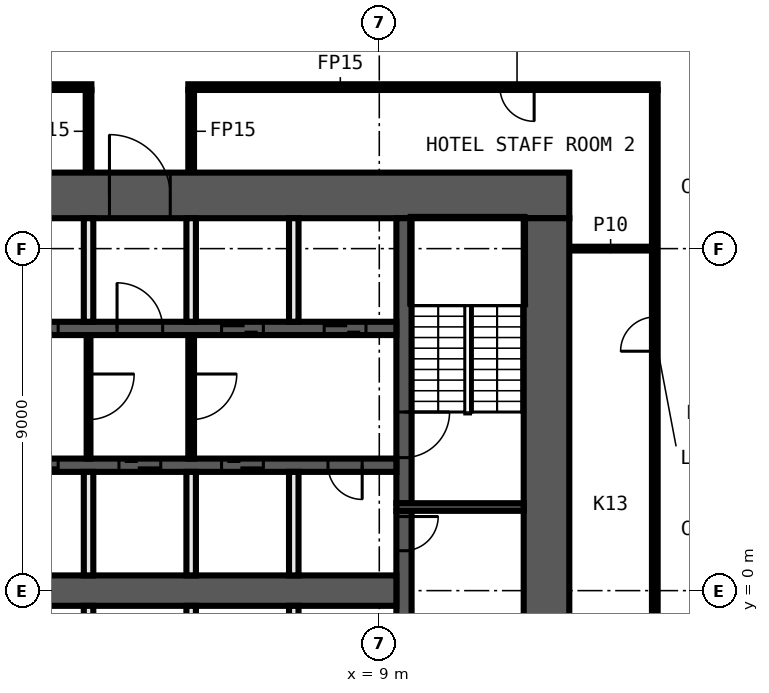
"""IFC4 building model, lengths in metres.
Left out: names, types, materials, properties, quantities, classifications, styles, units other than length and angle.
Written with IfcOpenShell. Run it as: python <this file> out.ifc"""

import sys

from ifc_helpers import new_model, si_unit, direction, frame, frame_2d, origin, place, context, subcontext, project, spatial, rectangle, extrude, element, fill, save


model = new_model("IFC4")
c1 = context("Model", 3, precision=1e-05, world=origin(), true_north=direction((0.0, 1.0)))
c2 = subcontext(c1, "Body", "Model", "MODEL_VIEW")
j1 = project(units=[si_unit("LENGTHUNIT", "METRE"), si_unit("PLANEANGLEUNIT", "RADIAN")], contexts=[c1])
p1 = place(None, origin())
s1 = spatial("IfcSite", under=j1, at=p1, CompositionType="ELEMENT")
p2 = place(p1, origin())
s2 = spatial("IfcBuilding", under=s1, at=p2, CompositionType="ELEMENT")
p3 = place(p2, frame((0.0, 0.0, 55.1)))
s3 = spatial("IfcBuildingStorey", under=s2, at=p3, CompositionType="ELEMENT", Elevation=55.1)
p4 = place(p3, frame((14.0, 9.0, 0.0), z_axis=(0.0, 0.0, 1.0), x_axis=(1.0, 0.0, 0.0)))
e1 = element("IfcWall", 1, at=p4, inside=s3, PredefinedType="PARTITIONING", context=c2, shape_type="SweptSolid", body=[
    extrude(rectangle(XDim=2.175, YDim=0.1, at=frame_2d((1.087, 0.0))), origin(), (0.0, 0.0, 1.0), 3.3),
])
p5 = place(p3, frame((1.425, 13.25, 0.0), z_axis=(0.0, 0.0, 1.0), x_axis=(-1.0, 0.0, 0.0)))
e2 = element("IfcWall", 2, at=p5, inside=s3, PredefinedType="PARTITIONING", context=c2, shape_type="SweptSolid", body=[
    extrude(rectangle(XDim=17.75, YDim=0.15, at=frame_2d((8.875, 0.0))), origin(), (0.0, 0.0, 1.0), 3.3),
])
p6 = place(p5, frame((7.725, 0.0, 0.0)))
e3 = element("IfcOpeningElement", 3, at=p6, cuts=e2, PredefinedType="OPENING", context=c2, shape_type="SweptSolid", body=[
    extrude(rectangle(XDim=0.9, YDim=2.1, at=frame_2d((0.45, 1.05))), frame((0.0, 0.085, 0.0), z_axis=(0.0, -1.0, 0.0), x_axis=(1.0, 0.0, 0.0)), (0.0, 0.0, 1.0), 0.17),
])
p7 = place(p5, frame((13.6, 0.0, 0.0)))
e4 = element("IfcOpeningElement", 4, at=p7, cuts=e2, PredefinedType="OPENING", context=c2, shape_type="SweptSolid", body=[
    extrude(rectangle(XDim=0.9, YDim=2.1, at=frame_2d((0.45, 1.05))), frame((0.0, 0.085, 0.0), z_axis=(0.0, -1.0, 0.0), x_axis=(1.0, 0.0, 0.0)), (0.0, 0.0, 1.0), 0.17),
])
p8 = place(p3, frame((16.325, 13.25, 0.0), z_axis=(0.0, 0.0, 1.0), x_axis=(-1.0, 0.0, 0.0)))
e5 = element("IfcWall", 5, at=p8, inside=s3, PredefinedType="PARTITIONING", context=c2, shape_type="SweptSolid", body=[
    extrude(rectangle(XDim=12.35, YDim=0.15, at=frame_2d((6.175, 0.0))), origin(), (0.0, 0.0, 1.0), 3.3),
])
p9 = place(p8, frame((3.25, 0.0, 0.0)))
e6 = element("IfcOpeningElement", 6, at=p9, cuts=e5, PredefinedType="OPENING", context=c2, shape_type="SweptSolid", body=[
    extrude(rectangle(XDim=0.9, YDim=2.1, at=frame_2d((0.45, 1.05))), frame((0.0, 0.085, 0.0), z_axis=(0.0, -1.0, 0.0), x_axis=(1.0, 0.0, 0.0)), (0.0, 0.0, 1.0), 0.17),
])
p10 = place(p3, frame((16.25, -13.175, 0.0), z_axis=(0.0, 0.0, 1.0), x_axis=(0.0, 1.0, 0.0)))
e7 = element("IfcWall", 7, at=p10, inside=s3, PredefinedType="PARTITIONING", context=c2, shape_type="SweptSolid", body=[
    extrude(rectangle(XDim=26.35, YDim=0.15, at=frame_2d((13.175, 0.0))), origin(), (0.0, 0.0, 1.0), 3.3),
])
p11 = place(p10, frame((19.475, 0.0, 0.0)))
e8 = element("IfcOpeningElement", 8, at=p11, cuts=e7, PredefinedType="OPENING", context=c2, shape_type="SweptSolid", body=[
    extrude(rectangle(XDim=0.9, YDim=2.1, at=frame_2d((0.45, 1.05))), frame((0.0, 0.085, 0.0), z_axis=(0.0, -1.0, 0.0), x_axis=(1.0, 0.0, 0.0)), (0.0, 0.0, 1.0), 0.17),
])
for number, where, z_axis, x_axis in (
    (9, (4.05, 11.0, 0.0), (0.0, 0.0, 1.0), (0.0, 1.0, 0.0)),
    (10, (1.35, 11.0, 0.0), (0.0, 0.0, 1.0), (0.0, 1.0, 0.0)),
):
    element("IfcWall", number, at=place(p3, frame(where, z_axis=z_axis, x_axis=x_axis)), inside=s3, PredefinedType="PARTITIONING", context=c2, shape_type="SweptSolid", body=[
        extrude(rectangle(XDim=2.175, YDim=0.15, at=frame_2d((1.087, 0.0))), origin(), (0.0, 0.0, 1.0), 3.3),
    ])
p12 = place(p3, frame((-14.0, 10.4, 0.0), z_axis=(0.0, 0.0, 1.0), x_axis=(1.0, 0.0, 0.0)))
e11 = element("IfcWall", 11, at=p12, inside=s3, PredefinedType="SHEAR", context=c2, shape_type="SweptSolid", body=[
    extrude(rectangle(XDim=28.0, YDim=1.2, at=frame_2d((14.0, 0.0))), origin(), (0.0, 0.0, 1.0), 3.3),
])
p13 = place(p12, frame((15.9, 0.0, 0.0)))
e12 = element("IfcOpeningElement", 12, at=p13, cuts=e11, PredefinedType="OPENING", context=c2, shape_type="SweptSolid", body=[
    extrude(rectangle(XDim=1.6, YDim=2.1, at=frame_2d((0.8, 1.05))), frame((0.0, 0.61, 0.0), z_axis=(0.0, -1.0, 0.0), x_axis=(1.0, 0.0, 0.0)), (0.0, 0.0, 1.0), 1.22),
])
p14 = place(p3, frame((13.4, 9.8, 0.0), z_axis=(0.0, 0.0, 1.0), x_axis=(0.0, -1.0, 0.0)))
e13 = element("IfcWall", 13, at=p14, inside=s3, PredefinedType="SHEAR", context=c2, shape_type="SweptSolid", body=[
    extrude(rectangle(XDim=19.6, YDim=1.2, at=frame_2d((9.8, 0.0))), origin(), (0.0, 0.0, 1.0), 3.3),
])
p15 = place(p3, frame((9.65, 2.1, 0.0), z_axis=(0.0, 0.0, 1.0), x_axis=(0.0, -1.0, 0.0)))
e14 = element("IfcWall", 14, at=p15, inside=s3, PredefinedType="SHEAR", context=c2, shape_type="SweptSolid", body=[
    extrude(rectangle(XDim=4.2, YDim=0.4, at=frame_2d((2.1, 0.0))), origin(), (0.0, 0.0, 1.0), 3.3),
])
p16 = place(p15, frame((0.15, 0.0, 0.0)))
e15 = element("IfcOpeningElement", 15, at=p16, cuts=e14, PredefinedType="OPENING", context=c2, shape_type="SweptSolid", body=[
    extrude(rectangle(XDim=0.9, YDim=2.1, at=frame_2d((0.45, 1.05))), frame((0.0, 0.21, 0.0), z_axis=(0.0, -1.0, 0.0), x_axis=(1.0, 0.0, 0.0)), (0.0, 0.0, 1.0), 0.42),
])
p17 = place(p3, frame((9.65, 9.8, 0.0), z_axis=(0.0, 0.0, 1.0), x_axis=(0.0, -1.0, 0.0)))
e16 = element("IfcWall", 16, at=p17, inside=s3, PredefinedType="SHEAR", context=c2, shape_type="SweptSolid", body=[
    extrude(rectangle(XDim=7.5, YDim=0.4, at=frame_2d((3.75, 0.0))), origin(), (0.0, 0.0, 1.0), 3.3),
])
p18 = place(p17, frame((5.1, 0.0, 0.0)))
e17 = element("IfcOpeningElement", 17, at=p18, cuts=e16, PredefinedType="OPENING", context=c2, shape_type="SweptSolid", body=[
    extrude(rectangle(XDim=1.2, YDim=2.1, at=frame_2d((0.6, 1.05))), frame((0.0, 0.21, 0.0), z_axis=(0.0, -1.0, 0.0), x_axis=(1.0, 0.0, 0.0)), (0.0, 0.0, 1.0), 0.42),
])
p19 = place(p3, frame((9.45, 2.2, 0.0), z_axis=(0.0, 0.0, 1.0), x_axis=(1.0, 0.0, 0.0)))
e18 = element("IfcWall", 18, at=p19, inside=s3, PredefinedType="SHEAR", context=c2, shape_type="SweptSolid", body=[
    extrude(rectangle(XDim=3.35, YDim=0.2, at=frame_2d((1.675, 0.0))), origin(), (0.0, 0.0, 1.0), 3.3),
])
p20 = place(p3, frame((-9.45, 6.9, 0.0), z_axis=(0.0, 0.0, 1.0), x_axis=(1.0, 0.0, 0.0)))
e19 = element("IfcWall", 19, at=p20, inside=s3, PredefinedType="SHEAR", context=c2, shape_type="SweptSolid", body=[
    extrude(rectangle(XDim=18.9, YDim=0.35, at=frame_2d((9.45, 0.0))), origin(), (0.0, 0.0, 1.0), 3.3),
])
p21 = place(p20, frame((0.8, 0.0, 0.0)))
e20 = element("IfcOpeningElement", 20, at=p21, cuts=e19, PredefinedType="OPENING", context=c2, shape_type="SweptSolid", body=[
    extrude(rectangle(XDim=1.1, YDim=2.1, at=frame_2d((0.55, 1.05))), frame((0.0, 0.185, 0.0), z_axis=(0.0, -1.0, 0.0), x_axis=(1.0, 0.0, 0.0)), (0.0, 0.0, 1.0), 0.37),
])
p22 = place(p20, frame((3.5, 0.0, 0.0)))
e21 = element("IfcOpeningElement", 21, at=p22, cuts=e19, PredefinedType="OPENING", context=c2, shape_type="SweptSolid", body=[
    extrude(rectangle(XDim=1.1, YDim=2.1, at=frame_2d((0.55, 1.05))), frame((0.0, 0.185, 0.0), z_axis=(0.0, -1.0, 0.0), x_axis=(1.0, 0.0, 0.0)), (0.0, 0.0, 1.0), 0.37),
])
p23 = place(p20, frame((6.2, 0.0, 0.0)))
e22 = element("IfcOpeningElement", 22, at=p23, cuts=e19, PredefinedType="OPENING", context=c2, shape_type="SweptSolid", body=[
    extrude(rectangle(XDim=1.1, YDim=2.1, at=frame_2d((0.55, 1.05))), frame((0.0, 0.185, 0.0), z_axis=(0.0, -1.0, 0.0), x_axis=(1.0, 0.0, 0.0)), (0.0, 0.0, 1.0), 0.37),
])
p24 = place(p20, frame((8.9, 0.0, 0.0)))
e23 = element("IfcOpeningElement", 23, at=p24, cuts=e19, PredefinedType="OPENING", context=c2, shape_type="SweptSolid", body=[
    extrude(rectangle(XDim=1.1, YDim=2.1, at=frame_2d((0.55, 1.05))), frame((0.0, 0.185, 0.0), z_axis=(0.0, -1.0, 0.0), x_axis=(1.0, 0.0, 0.0)), (0.0, 0.0, 1.0), 0.37),
])
p25 = place(p20, frame((11.55, 0.0, 0.0)))
e24 = element("IfcOpeningElement", 24, at=p25, cuts=e19, PredefinedType="OPENING", context=c2, shape_type="SweptSolid", body=[
    extrude(rectangle(XDim=1.2, YDim=2.1, at=frame_2d((0.6, 1.05))), frame((0.0, 0.185, 0.0), z_axis=(0.0, -1.0, 0.0), x_axis=(1.0, 0.0, 0.0)), (0.0, 0.0, 1.0), 0.37),
])
p26 = place(p20, frame((14.3, 0.0, 0.0)))
e25 = element("IfcOpeningElement", 25, at=p26, cuts=e19, PredefinedType="OPENING", context=c2, shape_type="SweptSolid", body=[
    extrude(rectangle(XDim=1.1, YDim=2.1, at=frame_2d((0.55, 1.05))), frame((0.0, 0.185, 0.0), z_axis=(0.0, -1.0, 0.0), x_axis=(1.0, 0.0, 0.0)), (0.0, 0.0, 1.0), 0.37),
])
p27 = place(p20, frame((17.0, 0.0, 0.0)))
e26 = element("IfcOpeningElement", 26, at=p27, cuts=e19, PredefinedType="OPENING", context=c2, shape_type="SweptSolid", body=[
    extrude(rectangle(XDim=1.1, YDim=2.1, at=frame_2d((0.55, 1.05))), frame((0.0, 0.185, 0.0), z_axis=(0.0, -1.0, 0.0), x_axis=(1.0, 0.0, 0.0)), (0.0, 0.0, 1.0), 0.37),
])
p28 = place(p3, frame((9.45, 3.3, 0.0), z_axis=(0.0, 0.0, 1.0), x_axis=(-1.0, 0.0, 0.0)))
e27 = element("IfcWall", 27, at=p28, inside=s3, PredefinedType="SHEAR", context=c2, shape_type="SweptSolid", body=[
    extrude(rectangle(XDim=18.9, YDim=0.35, at=frame_2d((9.45, 0.0))), origin(), (0.0, 0.0, 1.0), 3.3),
])
p29 = place(p28, frame((17.0, 0.0, 0.0)))
e28 = element("IfcOpeningElement", 28, at=p29, cuts=e27, PredefinedType="OPENING", context=c2, shape_type="SweptSolid", body=[
    extrude(rectangle(XDim=1.1, YDim=2.1, at=frame_2d((0.55, 1.05))), frame((0.0, 0.185, 0.0), z_axis=(0.0, -1.0, 0.0), x_axis=(1.0, 0.0, 0.0)), (0.0, 0.0, 1.0), 0.37),
])
p30 = place(p28, frame((14.3, 0.0, 0.0)))
e29 = element("IfcOpeningElement", 29, at=p30, cuts=e27, PredefinedType="OPENING", context=c2, shape_type="SweptSolid", body=[
    extrude(rectangle(XDim=1.1, YDim=2.1, at=frame_2d((0.55, 1.05))), frame((0.0, 0.185, 0.0), z_axis=(0.0, -1.0, 0.0), x_axis=(1.0, 0.0, 0.0)), (0.0, 0.0, 1.0), 0.37),
])
p31 = place(p28, frame((11.6, 0.0, 0.0)))
e30 = element("IfcOpeningElement", 30, at=p31, cuts=e27, PredefinedType="OPENING", context=c2, shape_type="SweptSolid", body=[
    extrude(rectangle(XDim=1.1, YDim=2.1, at=frame_2d((0.55, 1.05))), frame((0.0, 0.185, 0.0), z_axis=(0.0, -1.0, 0.0), x_axis=(1.0, 0.0, 0.0)), (0.0, 0.0, 1.0), 0.37),
])
p32 = place(p28, frame((8.9, 0.0, 0.0)))
e31 = element("IfcOpeningElement", 31, at=p32, cuts=e27, PredefinedType="OPENING", context=c2, shape_type="SweptSolid", body=[
    extrude(rectangle(XDim=1.1, YDim=2.1, at=frame_2d((0.55, 1.05))), frame((0.0, 0.185, 0.0), z_axis=(0.0, -1.0, 0.0), x_axis=(1.0, 0.0, 0.0)), (0.0, 0.0, 1.0), 0.37),
])
p33 = place(p28, frame((6.2, 0.0, 0.0)))
e32 = element("IfcOpeningElement", 32, at=p33, cuts=e27, PredefinedType="OPENING", context=c2, shape_type="SweptSolid", body=[
    extrude(rectangle(XDim=1.1, YDim=2.1, at=frame_2d((0.55, 1.05))), frame((0.0, 0.185, 0.0), z_axis=(0.0, -1.0, 0.0), x_axis=(1.0, 0.0, 0.0)), (0.0, 0.0, 1.0), 0.37),
])
p34 = place(p28, frame((3.5, 0.0, 0.0)))
e33 = element("IfcOpeningElement", 33, at=p34, cuts=e27, PredefinedType="OPENING", context=c2, shape_type="SweptSolid", body=[
    extrude(rectangle(XDim=1.1, YDim=2.1, at=frame_2d((0.55, 1.05))), frame((0.0, 0.185, 0.0), z_axis=(0.0, -1.0, 0.0), x_axis=(1.0, 0.0, 0.0)), (0.0, 0.0, 1.0), 0.37),
])
p35 = place(p28, frame((0.9, 0.0, 0.0)))
e34 = element("IfcOpeningElement", 34, at=p35, cuts=e27, PredefinedType="OPENING", context=c2, shape_type="SweptSolid", body=[
    extrude(rectangle(XDim=0.9, YDim=2.1, at=frame_2d((0.45, 1.05))), frame((0.0, 0.185, 0.0), z_axis=(0.0, -1.0, 0.0), x_axis=(1.0, 0.0, 0.0)), (0.0, 0.0, 1.0), 0.37),
])
p36 = place(p3, frame((-9.45, 0.0, 0.0), z_axis=(0.0, 0.0, 1.0), x_axis=(1.0, 0.0, 0.0)))
e35 = element("IfcWall", 35, at=p36, inside=s3, PredefinedType="SHEAR", context=c2, shape_type="SweptSolid", body=[
    extrude(rectangle(XDim=18.9, YDim=0.8, at=frame_2d((9.45, 0.0))), origin(), (0.0, 0.0, 1.0), 3.3),
])
for number, where, z_axis, x_axis in (
    (36, (6.75, -3.125, 0.0), (0.0, 0.0, 1.0), (0.0, 1.0, 0.0)),
    (37, (6.75, 0.4, 0.0), (0.0, 0.0, 1.0), (0.0, 1.0, 0.0)),
    (38, (6.75, 7.075, 0.0), (0.0, 0.0, 1.0), (0.0, 1.0, 0.0)),
):
    element("IfcWall", number, at=place(p3, frame(where, z_axis=z_axis, x_axis=x_axis)), inside=s3, PredefinedType="SOLIDWALL", context=c2, shape_type="SweptSolid", body=[
        extrude(rectangle(XDim=2.725, YDim=0.25, at=frame_2d((1.363, 0.0))), origin(), (0.0, 0.0, 1.0), 3.3),
    ])
p37 = place(p3, frame((4.05, 6.725, 0.0), z_axis=(0.0, 0.0, 1.0), x_axis=(0.0, -1.0, 0.0)))
e39 = element("IfcWall", 39, at=p37, inside=s3, PredefinedType="PARTITIONING", context=c2, shape_type="SweptSolid", body=[
    extrude(rectangle(XDim=3.25, YDim=0.15, at=frame_2d((1.625, 0.0))), origin(), (0.0, 0.0, 1.0), 3.3),
])
p38 = place(p37, frame((1.025, 0.0, 0.0)))
e40 = element("IfcOpeningElement", 40, at=p38, cuts=e39, PredefinedType="OPENING", context=c2, shape_type="SweptSolid", body=[
    extrude(rectangle(XDim=1.2, YDim=2.1, at=frame_2d((0.6, 1.05))), frame((0.0, 0.085, 0.0), z_axis=(0.0, -1.0, 0.0), x_axis=(1.0, 0.0, 0.0)), (0.0, 0.0, 1.0), 0.17),
])
for number, where, z_axis, x_axis in (
    (41, (4.05, -3.125, 0.0), (0.0, 0.0, 1.0), (0.0, 1.0, 0.0)),
    (42, (4.05, 0.4, 0.0), (0.0, 0.0, 1.0), (0.0, 1.0, 0.0)),
    (43, (4.05, 7.075, 0.0), (0.0, 0.0, 1.0), (0.0, 1.0, 0.0)),
):
    element("IfcWall", number, at=place(p3, frame(where, z_axis=z_axis, x_axis=x_axis)), inside=s3, PredefinedType="SOLIDWALL", context=c2, shape_type="SweptSolid", body=[
        extrude(rectangle(XDim=2.725, YDim=0.25, at=frame_2d((1.363, 0.0))), origin(), (0.0, 0.0, 1.0), 3.3),
    ])
p39 = place(p3, frame((1.35, 6.725, 0.0), z_axis=(0.0, 0.0, 1.0), x_axis=(0.0, -1.0, 0.0)))
e44 = element("IfcWall", 44, at=p39, inside=s3, PredefinedType="PARTITIONING", context=c2, shape_type="SweptSolid", body=[
    extrude(rectangle(XDim=3.25, YDim=0.1, at=frame_2d((1.625, 0.0))), origin(), (0.0, 0.0, 1.0), 3.3),
])
p40 = place(p39, frame((1.025, 0.0, 0.0)))
e45 = element("IfcOpeningElement", 45, at=p40, cuts=e44, PredefinedType="OPENING", context=c2, shape_type="SweptSolid", body=[
    extrude(rectangle(XDim=1.2, YDim=2.1, at=frame_2d((0.6, 1.05))), frame((0.0, 0.06, 0.0), z_axis=(0.0, -1.0, 0.0), x_axis=(1.0, 0.0, 0.0)), (0.0, 0.0, 1.0), 0.12),
])
for number, where, z_axis, x_axis in (
    (46, (1.35, -3.125, 0.0), (0.0, 0.0, 1.0), (0.0, 1.0, 0.0)),
    (47, (1.35, 0.4, 0.0), (0.0, 0.0, 1.0), (0.0, 1.0, 0.0)),
    (48, (1.35, 7.075, 0.0), (0.0, 0.0, 1.0), (0.0, 1.0, 0.0)),
):
    element("IfcWall", number, at=place(p3, frame(where, z_axis=z_axis, x_axis=x_axis)), inside=s3, PredefinedType="SOLIDWALL", context=c2, shape_type="SweptSolid", body=[
        extrude(rectangle(XDim=2.725, YDim=0.25, at=frame_2d((1.363, 0.0))), origin(), (0.0, 0.0, 1.0), 3.3),
    ])
p41 = place(p11, origin())
e49 = element("IfcDoor", 49, at=p41, inside=s3, OperationType="SINGLE_SWING_RIGHT", PredefinedType="DOOR", context=c2, shape_type="SweptSolid", body=[
    extrude(rectangle(XDim=0.9, YDim=2.1, at=frame_2d((0.45, 1.05))), frame((0.0, 0.025, 0.0), z_axis=(0.0, -1.0, 0.0), x_axis=(1.0, 0.0, 0.0)), (0.0, 0.0, 1.0), 0.05),
])
fill(e8, e49)
p42 = place(p9, origin())
e50 = element("IfcDoor", 50, at=p42, inside=s3, OperationType="SINGLE_SWING_LEFT", PredefinedType="DOOR", context=c2, shape_type="SweptSolid", body=[
    extrude(rectangle(XDim=0.9, YDim=2.1, at=frame_2d((0.45, 1.05))), frame((0.0, 0.025, 0.0), z_axis=(0.0, -1.0, 0.0), x_axis=(1.0, 0.0, 0.0)), (0.0, 0.0, 1.0), 0.05),
])
fill(e6, e50)
p43 = place(p16, origin())
e51 = element("IfcDoor", 51, at=p43, inside=s3, OperationType="SINGLE_SWING_RIGHT", PredefinedType="DOOR", context=c2, shape_type="SweptSolid", body=[
    extrude(rectangle(XDim=0.9, YDim=2.1, at=frame_2d((0.45, 1.05))), frame((0.0, 0.025, 0.0), z_axis=(0.0, -1.0, 0.0), x_axis=(1.0, 0.0, 0.0)), (0.0, 0.0, 1.0), 0.05),
])
fill(e15, e51)
p44 = place(p24, origin())
e52 = element("IfcDoor", 52, at=p44, inside=s3, OperationType="DOUBLE_DOOR_SLIDING", PredefinedType="DOOR", context=c2, shape_type="SweptSolid", body=[
    extrude(rectangle(XDim=1.1, YDim=2.1, at=frame_2d((0.55, 1.05))), frame((0.0, 0.025, 0.0), z_axis=(0.0, -1.0, 0.0), x_axis=(1.0, 0.0, 0.0)), (0.0, 0.0, 1.0), 0.05),
])
fill(e23, e52)
p45 = place(p13, origin())
e53 = element("IfcDoor", 53, at=p45, inside=s3, OperationType="DOUBLE_DOOR_SINGLE_SWING", PredefinedType="DOOR", context=c2, shape_type="SweptSolid", body=[
    extrude(rectangle(XDim=1.6, YDim=2.1, at=frame_2d((0.8, 1.05))), frame((0.0, 0.025, 0.0), z_axis=(0.0, -1.0, 0.0), x_axis=(1.0, 0.0, 0.0)), (0.0, 0.0, 1.0), 0.05),
])
fill(e12, e53)
p46 = place(p25, origin())
e54 = element("IfcDoor", 54, at=p46, inside=s3, OperationType="SINGLE_SWING_LEFT", PredefinedType="DOOR", context=c2, shape_type="SweptSolid", body=[
    extrude(rectangle(XDim=1.2, YDim=2.1, at=frame_2d((0.6, 1.05))), frame((0.0, 0.025, 0.0), z_axis=(0.0, -1.0, 0.0), x_axis=(1.0, 0.0, 0.0)), (0.0, 0.0, 1.0), 0.05),
])
fill(e24, e54)
p47 = place(p26, origin())
e55 = element("IfcDoor", 55, at=p47, inside=s3, OperationType="DOUBLE_DOOR_SLIDING", PredefinedType="DOOR", context=c2, shape_type="SweptSolid", body=[
    extrude(rectangle(XDim=1.1, YDim=2.1, at=frame_2d((0.55, 1.05))), frame((0.0, 0.025, 0.0), z_axis=(0.0, -1.0, 0.0), x_axis=(1.0, 0.0, 0.0)), (0.0, 0.0, 1.0), 0.05),
])
fill(e25, e55)
p48 = place(p27, origin())
e56 = element("IfcDoor", 56, at=p48, inside=s3, OperationType="DOUBLE_DOOR_SLIDING", PredefinedType="DOOR", context=c2, shape_type="SweptSolid", body=[
    extrude(rectangle(XDim=1.1, YDim=2.1, at=frame_2d((0.55, 1.05))), frame((0.0, 0.025, 0.0), z_axis=(0.0, -1.0, 0.0), x_axis=(1.0, 0.0, 0.0)), (0.0, 0.0, 1.0), 0.05),
])
fill(e26, e56)
p49 = place(p32, origin())
e57 = element("IfcDoor", 57, at=p49, inside=s3, OperationType="DOUBLE_DOOR_SLIDING", PredefinedType="DOOR", context=c2, shape_type="SweptSolid", body=[
    extrude(rectangle(XDim=1.1, YDim=2.1, at=frame_2d((0.55, 1.05))), frame((0.0, 0.025, 0.0), z_axis=(0.0, -1.0, 0.0), x_axis=(1.0, 0.0, 0.0)), (0.0, 0.0, 1.0), 0.05),
])
fill(e31, e57)
p50 = place(p33, origin())
e58 = element("IfcDoor", 58, at=p50, inside=s3, OperationType="DOUBLE_DOOR_SLIDING", PredefinedType="DOOR", context=c2, shape_type="SweptSolid", body=[
    extrude(rectangle(XDim=1.1, YDim=2.1, at=frame_2d((0.55, 1.05))), frame((0.0, 0.025, 0.0), z_axis=(0.0, -1.0, 0.0), x_axis=(1.0, 0.0, 0.0)), (0.0, 0.0, 1.0), 0.05),
])
fill(e32, e58)
p51 = place(p34, origin())
e59 = element("IfcDoor", 59, at=p51, inside=s3, OperationType="DOUBLE_DOOR_SLIDING", PredefinedType="DOOR", context=c2, shape_type="SweptSolid", body=[
    extrude(rectangle(XDim=1.1, YDim=2.1, at=frame_2d((0.55, 1.05))), frame((0.0, 0.025, 0.0), z_axis=(0.0, -1.0, 0.0), x_axis=(1.0, 0.0, 0.0)), (0.0, 0.0, 1.0), 0.05),
])
fill(e33, e59)
p52 = place(p35, origin())
e60 = element("IfcDoor", 60, at=p52, inside=s3, OperationType="SINGLE_SWING_LEFT", PredefinedType="DOOR", context=c2, shape_type="SweptSolid", body=[
    extrude(rectangle(XDim=0.9, YDim=2.1, at=frame_2d((0.45, 1.05))), frame((0.0, 0.025, 0.0), z_axis=(0.0, -1.0, 0.0), x_axis=(1.0, 0.0, 0.0)), (0.0, 0.0, 1.0), 0.05),
])
fill(e34, e60)
p53 = place(p18, origin())
e61 = element("IfcDoor", 61, at=p53, inside=s3, OperationType="SINGLE_SWING_LEFT", PredefinedType="DOOR", context=c2, shape_type="SweptSolid", body=[
    extrude(rectangle(XDim=1.2, YDim=2.1, at=frame_2d((0.6, 1.05))), frame((0.0, 0.025, 0.0), z_axis=(0.0, -1.0, 0.0), x_axis=(1.0, 0.0, 0.0)), (0.0, 0.0, 1.0), 0.05),
])
fill(e17, e61)
p54 = place(p40, origin())
e62 = element("IfcDoor", 62, at=p54, inside=s3, OperationType="SINGLE_SWING_LEFT", PredefinedType="DOOR", context=c2, shape_type="SweptSolid", body=[
    extrude(rectangle(XDim=1.2, YDim=2.1, at=frame_2d((0.6, 1.05))), frame((0.0, 0.025, 0.0), z_axis=(0.0, -1.0, 0.0), x_axis=(1.0, 0.0, 0.0)), (0.0, 0.0, 1.0), 0.05),
])
fill(e45, e62)
p55 = place(p38, origin())
e63 = element("IfcDoor", 63, at=p55, inside=s3, OperationType="SINGLE_SWING_RIGHT", PredefinedType="DOOR", context=c2, shape_type="SweptSolid", body=[
    extrude(rectangle(XDim=1.2, YDim=2.1, at=frame_2d((0.6, 1.05))), frame((0.0, 0.025, 0.0), z_axis=(0.0, -1.0, 0.0), x_axis=(1.0, 0.0, 0.0)), (0.0, 0.0, 1.0), 0.05),
])
fill(e40, e63)
save(model, sys.argv[1])
